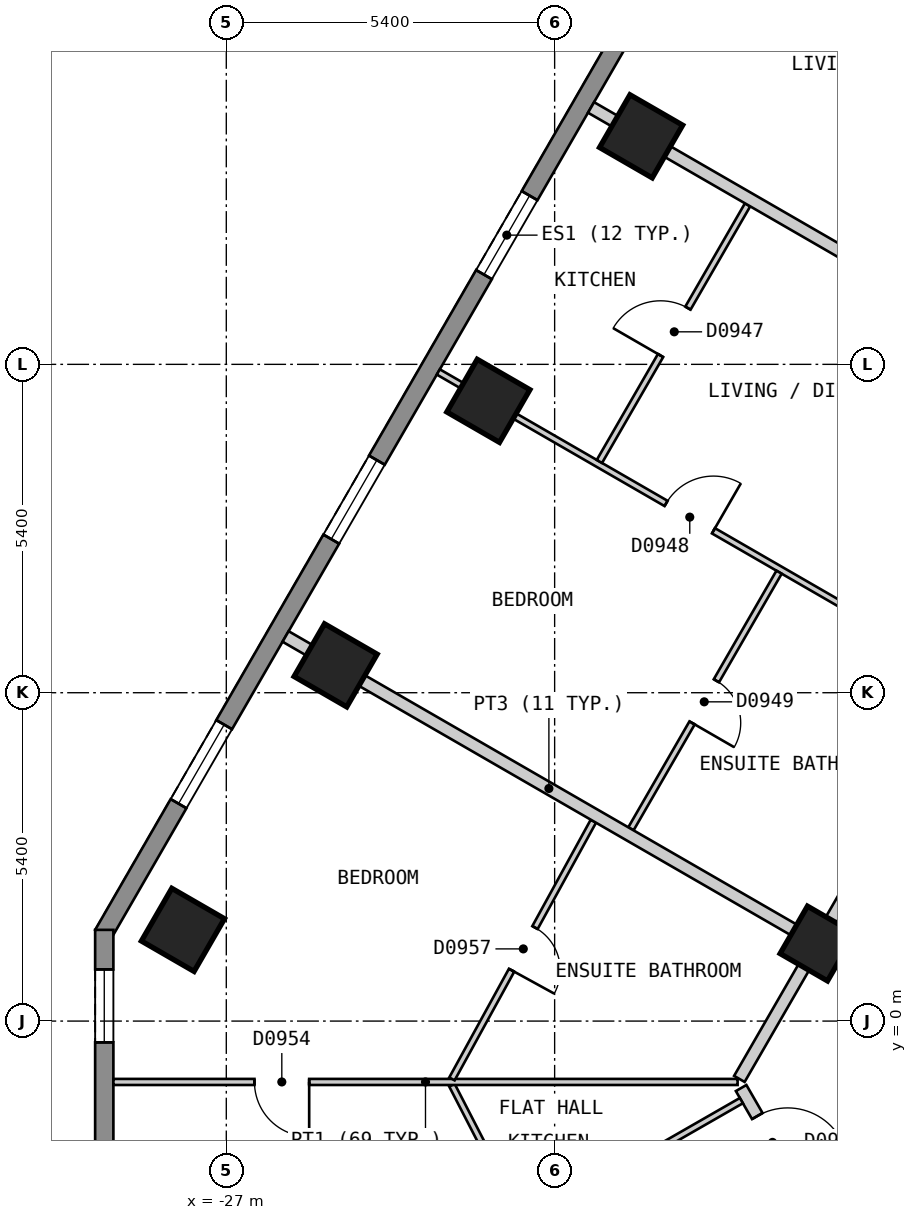
"""IFC4 building model, lengths in metres.
Left out: names, types, materials, properties, quantities, classifications, styles, units other than length and angle.
Written with IfcOpenShell. Run it as: python <this file> out.ifc"""

import sys

from ifc_helpers import new_model, si_unit, direction, frame, frame_2d, origin, origin_2d, place, context, subcontext, project, spatial, polyline, rectangle, outline, extrude, element, fill, save


model = new_model("IFC4")
c1 = context("Model", 3, precision=1e-05, world=origin(), true_north=direction((0.0, 1.0)))
c2 = subcontext(c1, "Body", "Model", "MODEL_VIEW")
j1 = project(units=[si_unit("LENGTHUNIT", "METRE"), si_unit("PLANEANGLEUNIT", "RADIAN")], contexts=[c1])
p1 = place(None, origin())
s1 = spatial("IfcSite", under=j1, at=p1, CompositionType="ELEMENT")
p2 = place(p1, origin())
s2 = spatial("IfcBuilding", under=s1, at=p2, CompositionType="ELEMENT")
p3 = place(p2, frame((0.0, 0.0, 102.0)))
s3 = spatial("IfcBuildingStorey", under=s2, at=p3, CompositionType="ELEMENT", Elevation=102.0)
for number, where, z_axis, x_axis in (
    (1, (-20.178, 14.55, 0.0), (0.0, 0.0, 1.0), (-0.5, -0.866, 0.0)),
    (2, (-22.69, 10.2, 0.0), (0.0, 0.0, 1.0), (-0.5, -0.866, 0.0)),
    (3, (-25.202, 5.85, 0.0), (0.0, 0.0, 1.0), (-0.5, -0.866, 0.0)),
    (4, (-27.713, 1.5, 0.0), (0.0, 0.0, 1.0), (-0.5, -0.866, 0.0)),
):
    element("IfcColumn", number, at=place(p3, frame(where, z_axis=z_axis, x_axis=x_axis)), inside=s3, PredefinedType="COLUMN", context=c2, shape_type="SweptSolid", body=[
        extrude(rectangle(XDim=1.0, YDim=1.0, at=origin_2d()), origin(), (0.0, 0.0, 1.0), 3.0),
    ])
p4 = place(p3, frame((-17.277, 1.275, 0.0), z_axis=(0.0, 0.0, 1.0), x_axis=(-0.5, -0.866025403784, 0.0)))
e5 = element("IfcColumn", 5, at=p4, inside=s3, PredefinedType="COLUMN", context=c2, shape_type="SweptSolid", body=[
    extrude(rectangle(XDim=0.9, YDim=0.9, at=origin_2d()), origin(), (0.0, 0.0, 1.0), 3.0),
])
p5 = place(p3, frame((-15.747, 24.425, 0.0), z_axis=(0.0, 0.0, 1.0), x_axis=(-0.500027479704, -0.866009537788, 0.0)))
e6 = element("IfcWall", 6, at=p5, inside=s3, PredefinedType="SOLIDWALL", context=c2, shape_type="SweptSolid", body=[
    extrude(outline(polyline([(0.0, -0.15), (26.559, -0.15), (26.478, 0.15), (0.08, 0.15), (0.0, -0.15)])), origin(), (0.0, 0.0, 1.0), 2.7),
])
p6 = place(p5, frame((2.483, 0.0, 0.15)))
e7 = element("IfcOpeningElement", 7, at=p6, cuts=e6, PredefinedType="OPENING", context=c2, shape_type="SweptSolid", body=[
    extrude(rectangle(XDim=1.5, YDim=2.1, at=frame_2d((0.75, 1.05))), frame((0.0, 0.16, 0.0), z_axis=(0.0, -1.0, 0.0), x_axis=(1.0, 0.0, 0.0)), (0.0, 0.0, 1.0), 0.32),
])
p7 = place(p5, frame((7.506, 0.0, 0.15)))
e8 = element("IfcOpeningElement", 8, at=p7, cuts=e6, PredefinedType="OPENING", context=c2, shape_type="SweptSolid", body=[
    extrude(rectangle(XDim=1.5, YDim=2.1, at=frame_2d((0.75, 1.05))), frame((0.0, 0.16, 0.0), z_axis=(0.0, -1.0, 0.0), x_axis=(1.0, 0.0, 0.0)), (0.0, 0.0, 1.0), 0.32),
])
p8 = place(p5, frame((12.529, 0.0, 0.15)))
e9 = element("IfcOpeningElement", 9, at=p8, cuts=e6, PredefinedType="OPENING", context=c2, shape_type="SweptSolid", body=[
    extrude(rectangle(XDim=1.5, YDim=2.1, at=frame_2d((0.75, 1.05))), frame((0.0, 0.16, 0.0), z_axis=(0.0, -1.0, 0.0), x_axis=(1.0, 0.0, 0.0)), (0.0, 0.0, 1.0), 0.32),
])
p9 = place(p5, frame((17.552, 0.0, 0.15)))
e10 = element("IfcOpeningElement", 10, at=p9, cuts=e6, PredefinedType="OPENING", context=c2, shape_type="SweptSolid", body=[
    extrude(rectangle(XDim=1.5, YDim=2.1, at=frame_2d((0.75, 1.05))), frame((0.0, 0.16, 0.0), z_axis=(0.0, -1.0, 0.0), x_axis=(1.0, 0.0, 0.0)), (0.0, 0.0, 1.0), 0.32),
])
p10 = place(p5, frame((22.575, 0.0, 0.15)))
e11 = element("IfcOpeningElement", 11, at=p10, cuts=e6, PredefinedType="OPENING", context=c2, shape_type="SweptSolid", body=[
    extrude(rectangle(XDim=1.5, YDim=2.1, at=frame_2d((0.75, 1.05))), frame((0.0, 0.16, 0.0), z_axis=(0.0, -1.0, 0.0), x_axis=(1.0, 0.0, 0.0)), (0.0, 0.0, 1.0), 0.32),
])
p11 = place(p3, frame((-29.007, 1.5, 0.0), z_axis=(0.0, 0.0, 1.0), x_axis=(0.0, -1.0, 0.0)))
e12 = element("IfcWall", 12, at=p11, inside=s3, PredefinedType="SOLIDWALL", context=c2, shape_type="SweptSolid", body=[
    extrude(outline(polyline([(0.0, -0.15), (5.0, -0.15), (4.92, 0.15), (0.08, 0.15), (0.0, -0.15)])), origin(), (0.0, 0.0, 1.0), 2.7),
])
p12 = place(p11, frame((0.65, 0.0, 0.15)))
e13 = element("IfcOpeningElement", 13, at=p12, cuts=e12, PredefinedType="OPENING", context=c2, shape_type="SweptSolid", body=[
    extrude(rectangle(XDim=1.2, YDim=2.1, at=frame_2d((0.6, 1.05))), frame((0.0, 0.16, 0.0), z_axis=(0.0, -1.0, 0.0), x_axis=(1.0, 0.0, 0.0)), (0.0, 0.0, 1.0), 0.32),
])
p13 = place(p3, frame((-18.533, -1.101, 0.0), z_axis=(0.0, 0.0, 1.0), x_axis=(0.500022085096, -0.866012652573, 0.0)))
e14 = element("IfcWall", 14, at=p13, inside=s3, PredefinedType="PARTITIONING", context=c2, shape_type="SweptSolid", body=[
    extrude(rectangle(XDim=6.066, YDim=0.2, at=frame_2d((3.033, 0.0))), origin(), (0.0, 0.0, 1.0), 2.7),
])
p14 = place(p13, frame((0.532, 0.0, 0.0)))
e15 = element("IfcOpeningElement", 15, at=p14, cuts=e14, PredefinedType="OPENING", context=c2, shape_type="SweptSolid", body=[
    extrude(rectangle(XDim=1.0, YDim=2.1, at=frame_2d((0.5, 1.05))), frame((0.0, 0.11, 0.0), z_axis=(0.0, -1.0, 0.0), x_axis=(1.0, 0.0, 0.0)), (0.0, 0.0, 1.0), 0.22),
])
p15 = place(p3, frame((-18.562, -0.951, 0.0), z_axis=(0.0, 0.0, 1.0), x_axis=(0.499987097491, 0.866032852923, 0.0)))
e16 = element("IfcWall", 16, at=p15, inside=s3, PredefinedType="PARTITIONING", context=c2, shape_type="SweptSolid", body=[
    extrude(rectangle(XDim=20.15, YDim=0.2, at=frame_2d((10.075, 0.0))), origin(), (0.0, 0.0, 1.0), 2.7),
])
p16 = place(p15, frame((14.627, 0.0, 0.0)))
e17 = element("IfcOpeningElement", 17, at=p16, cuts=e16, PredefinedType="OPENING", context=c2, shape_type="SweptSolid", body=[
    extrude(rectangle(XDim=1.0, YDim=2.1, at=frame_2d((0.5, 1.05))), frame((0.0, 0.11, 0.0), z_axis=(0.0, -1.0, 0.0), x_axis=(1.0, 0.0, 0.0)), (0.0, 0.0, 1.0), 0.22),
])
p17 = place(p15, frame((9.604, 0.0, 0.0)))
e18 = element("IfcOpeningElement", 18, at=p17, cuts=e16, PredefinedType="OPENING", context=c2, shape_type="SweptSolid", body=[
    extrude(rectangle(XDim=1.0, YDim=2.1, at=frame_2d((0.5, 1.05))), frame((0.0, 0.11, 0.0), z_axis=(0.0, -1.0, 0.0), x_axis=(1.0, 0.0, 0.0)), (0.0, 0.0, 1.0), 0.22),
])
p18 = place(p3, frame((-23.289, -1.054, 0.0), z_axis=(0.0, 0.0, 1.0), x_axis=(0.458226112305, -0.888835659726, 0.0)))
e19 = element("IfcWall", 19, at=p18, inside=s3, PredefinedType="PARTITIONING", context=c2, shape_type="SweptSolid", body=[
    extrude(rectangle(XDim=2.104, YDim=0.1, at=frame_2d((1.052, 0.0))), origin(), (0.0, 0.0, 1.0), 2.7),
])
p19 = place(p3, frame((-23.513, 10.675, 0.0), z_axis=(0.0, 0.0, 1.0), x_axis=(0.866041268327, -0.499972520799, 0.0)))
e20 = element("IfcWall", 20, at=p19, inside=s3, PredefinedType="PARTITIONING", context=c2, shape_type="SweptSolid", body=[
    extrude(rectangle(XDim=10.0, YDim=0.1, at=frame_2d((5.0, 0.0))), origin(), (0.0, 0.0, 1.0), 2.7),
])
p20 = place(p19, frame((4.325, 0.0, 0.0)))
e21 = element("IfcOpeningElement", 21, at=p20, cuts=e20, PredefinedType="OPENING", context=c2, shape_type="SweptSolid", body=[
    extrude(rectangle(XDim=0.9, YDim=2.1, at=frame_2d((0.45, 1.05))), frame((0.0, 0.06, 0.0), z_axis=(0.0, -1.0, 0.0), x_axis=(1.0, 0.0, 0.0)), (0.0, 0.0, 1.0), 0.12),
])
p21 = place(p3, frame((-18.489, 19.375, 0.0), z_axis=(0.0, 0.0, 1.0), x_axis=(0.866016855193, -0.500014806302, 0.0)))
e22 = element("IfcWall", 22, at=p21, inside=s3, PredefinedType="PARTITIONING", context=c2, shape_type="SweptSolid", body=[
    extrude(rectangle(XDim=10.0, YDim=0.1, at=frame_2d((5.0, 0.0))), origin(), (0.0, 0.0, 1.0), 2.7),
])
p22 = place(p21, frame((2.577, 0.0, 0.0)))
e23 = element("IfcOpeningElement", 23, at=p22, cuts=e22, PredefinedType="OPENING", context=c2, shape_type="SweptSolid", body=[
    extrude(rectangle(XDim=0.9, YDim=2.1, at=frame_2d((0.45, 1.05))), frame((0.0, 0.06, 0.0), z_axis=(0.0, -1.0, 0.0), x_axis=(1.0, 0.0, 0.0)), (0.0, 0.0, 1.0), 0.12),
])
p23 = place(p3, frame((-28.857, -1.001, 0.0), z_axis=(0.0, 0.0, 1.0), x_axis=(1.0, 0.0, 0.0)))
e24 = element("IfcWall", 24, at=p23, inside=s3, PredefinedType="PARTITIONING", context=c2, shape_type="SweptSolid", body=[
    extrude(rectangle(XDim=10.266, YDim=0.1, at=frame_2d((5.133, 0.0))), origin(), (0.0, 0.0, 1.0), 2.7),
])
p24 = place(p23, frame((2.32, 0.0, 0.0)))
e25 = element("IfcOpeningElement", 25, at=p24, cuts=e24, PredefinedType="OPENING", context=c2, shape_type="SweptSolid", body=[
    extrude(rectangle(XDim=0.9, YDim=2.1, at=frame_2d((0.45, 1.05))), frame((0.0, 0.06, 0.0), z_axis=(0.0, -1.0, 0.0), x_axis=(1.0, 0.0, 0.0)), (0.0, 0.0, 1.0), 0.12),
])
p25 = place(p3, frame((-20.345, 3.162, 0.0), z_axis=(0.0, 0.0, 1.0), x_axis=(0.499943653708, 0.866057932887, 0.0)))
e26 = element("IfcWall", 26, at=p25, inside=s3, PredefinedType="PARTITIONING", context=c2, shape_type="SweptSolid", body=[
    extrude(rectangle(XDim=4.873, YDim=0.1, at=frame_2d((2.436, 0.0))), origin(), (0.0, 0.0, 1.0), 2.7),
])
p26 = place(p25, frame((2.011, 0.0, 0.0)))
e27 = element("IfcOpeningElement", 27, at=p26, cuts=e26, PredefinedType="OPENING", context=c2, shape_type="SweptSolid", body=[
    extrude(rectangle(XDim=0.8, YDim=2.1, at=frame_2d((0.4, 1.05))), frame((0.0, 0.06, 0.0), z_axis=(0.0, -1.0, 0.0), x_axis=(1.0, 0.0, 0.0)), (0.0, 0.0, 1.0), 0.12),
])
p27 = place(p3, frame((-20.864, 9.203, 0.0), z_axis=(0.0, 0.0, 1.0), x_axis=(0.500072260509, 0.86598368014, 0.0)))
e28 = element("IfcWall", 28, at=p27, inside=s3, PredefinedType="PARTITIONING", context=c2, shape_type="SweptSolid", body=[
    extrude(rectangle(XDim=4.873, YDim=0.1, at=frame_2d((2.437, 0.0))), origin(), (0.0, 0.0, 1.0), 2.7),
])
p28 = place(p27, frame((2.012, 0.0, 0.0)))
e29 = element("IfcOpeningElement", 29, at=p28, cuts=e28, PredefinedType="OPENING", context=c2, shape_type="SweptSolid", body=[
    extrude(rectangle(XDim=0.9, YDim=2.1, at=frame_2d((0.45, 1.05))), frame((0.0, 0.06, 0.0), z_axis=(0.0, -1.0, 0.0), x_axis=(1.0, 0.0, 0.0)), (0.0, 0.0, 1.0), 0.12),
])
p29 = place(p3, frame((-23.289, -0.951, 0.0), z_axis=(0.0, 0.0, 1.0), x_axis=(0.481164463081, 0.876630343684, 0.0)))
e30 = element("IfcWall", 30, at=p29, inside=s3, PredefinedType="PARTITIONING", context=c2, shape_type="SweptSolid", body=[
    extrude(rectangle(XDim=4.834, YDim=0.1, at=frame_2d((2.417, 0.0))), origin(), (0.0, 0.0, 1.0), 2.7),
])
p30 = place(p29, frame((2.039, 0.0, 0.0)))
e31 = element("IfcOpeningElement", 31, at=p30, cuts=e30, PredefinedType="OPENING", context=c2, shape_type="SweptSolid", body=[
    extrude(rectangle(XDim=0.8, YDim=2.1, at=frame_2d((0.4, 1.05))), frame((0.0, 0.06, 0.0), z_axis=(0.0, -1.0, 0.0), x_axis=(1.0, 0.0, 0.0)), (0.0, 0.0, 1.0), 0.12),
])
p31 = place(p3, frame((-22.25, -3.443, 0.0), z_axis=(0.0, 0.0, 1.0), x_axis=(0.867362741349, 0.497676476156, 0.0)))
e32 = element("IfcWall", 32, at=p31, inside=s3, PredefinedType="PARTITIONING", context=c2, shape_type="SweptSolid", body=[
    extrude(rectangle(XDim=4.29, YDim=0.1, at=frame_2d((2.145, 0.0))), origin(), (0.0, 0.0, 1.0), 2.7),
])
p32 = place(p31, frame((1.715, 0.0, 0.0)))
e33 = element("IfcOpeningElement", 33, at=p32, cuts=e32, PredefinedType="OPENING", context=c2, shape_type="SweptSolid", body=[
    extrude(rectangle(XDim=0.9, YDim=2.1, at=frame_2d((0.45, 1.05))), frame((0.0, 0.06, 0.0), z_axis=(0.0, -1.0, 0.0), x_axis=(1.0, 0.0, 0.0)), (0.0, 0.0, 1.0), 0.12),
])
p33 = place(p3, frame((-26.025, 6.325, 0.0), z_axis=(0.0, 0.0, 1.0), x_axis=(0.866041268327, -0.499972520799, 0.0)))
e34 = element("IfcWall", 34, at=p33, inside=s3, PredefinedType="PARTITIONING", context=c2, shape_type="SweptSolid", body=[
    extrude(rectangle(XDim=10.0, YDim=0.2, at=frame_2d((5.0, 0.0))), origin(), (0.0, 0.0, 1.0), 2.7),
])
p34 = place(p3, frame((-21.001, 15.025, 0.0), z_axis=(0.0, 0.0, 1.0), x_axis=(0.866016855193, -0.500014806302, 0.0)))
e35 = element("IfcWall", 35, at=p34, inside=s3, PredefinedType="PARTITIONING", context=c2, shape_type="SweptSolid", body=[
    extrude(rectangle(XDim=10.0, YDim=0.2, at=frame_2d((5.0, 0.0))), origin(), (0.0, 0.0, 1.0), 2.7),
])
p35 = place(p8, origin())
e36 = element("IfcWindow", 36, at=p35, inside=s3, PartitioningType="SINGLE_PANEL", PredefinedType="WINDOW", context=c2, shape_type="SweptSolid", body=[
    extrude(rectangle(XDim=1.5, YDim=2.1, at=frame_2d((0.75, 1.05))), frame((0.0, 0.03, 0.0), z_axis=(0.0, -1.0, 0.0), x_axis=(1.0, 0.0, 0.0)), (0.0, 0.0, 1.0), 0.06),
])
fill(e9, e36)
p36 = place(p9, origin())
e37 = element("IfcWindow", 37, at=p36, inside=s3, PartitioningType="SINGLE_PANEL", PredefinedType="WINDOW", context=c2, shape_type="SweptSolid", body=[
    extrude(rectangle(XDim=1.5, YDim=2.1, at=frame_2d((0.75, 1.05))), frame((0.0, 0.03, 0.0), z_axis=(0.0, -1.0, 0.0), x_axis=(1.0, 0.0, 0.0)), (0.0, 0.0, 1.0), 0.06),
])
fill(e10, e37)
p37 = place(p10, origin())
e38 = element("IfcWindow", 38, at=p37, inside=s3, PartitioningType="SINGLE_PANEL", PredefinedType="WINDOW", context=c2, shape_type="SweptSolid", body=[
    extrude(rectangle(XDim=1.5, YDim=2.1, at=frame_2d((0.75, 1.05))), frame((0.0, 0.03, 0.0), z_axis=(0.0, -1.0, 0.0), x_axis=(1.0, 0.0, 0.0)), (0.0, 0.0, 1.0), 0.06),
])
fill(e11, e38)
p38 = place(p12, origin())
e39 = element("IfcWindow", 39, at=p38, inside=s3, PartitioningType="SINGLE_PANEL", PredefinedType="WINDOW", context=c2, shape_type="SweptSolid", body=[
    extrude(rectangle(XDim=1.2, YDim=2.1, at=frame_2d((0.6, 1.05))), frame((0.0, 0.03, 0.0), z_axis=(0.0, -1.0, 0.0), x_axis=(1.0, 0.0, 0.0)), (0.0, 0.0, 1.0), 0.06),
])
fill(e13, e39)
p39 = place(p28, origin())
e40 = element("IfcDoor", 40, at=p39, inside=s3, OperationType="SINGLE_SWING_LEFT", PredefinedType="DOOR", context=c2, shape_type="SweptSolid", body=[
    extrude(rectangle(XDim=0.9, YDim=2.1, at=frame_2d((0.45, 1.05))), frame((0.0, 0.025, 0.0), z_axis=(0.0, -1.0, 0.0), x_axis=(1.0, 0.0, 0.0)), (0.0, 0.0, 1.0), 0.05),
])
fill(e29, e40)
p40 = place(p20, origin())
e41 = element("IfcDoor", 41, at=p40, inside=s3, OperationType="SINGLE_SWING_RIGHT", PredefinedType="DOOR", context=c2, shape_type="SweptSolid", body=[
    extrude(rectangle(XDim=0.9, YDim=2.1, at=frame_2d((0.45, 1.05))), frame((0.0, 0.025, 0.0), z_axis=(0.0, -1.0, 0.0), x_axis=(1.0, 0.0, 0.0)), (0.0, 0.0, 1.0), 0.05),
])
fill(e21, e41)
p41 = place(p26, origin())
e42 = element("IfcDoor", 42, at=p41, inside=s3, OperationType="SINGLE_SWING_LEFT", PredefinedType="DOOR", context=c2, shape_type="SweptSolid", body=[
    extrude(rectangle(XDim=0.8, YDim=2.1, at=frame_2d((0.4, 1.05))), frame((0.0, 0.025, 0.0), z_axis=(0.0, -1.0, 0.0), x_axis=(1.0, 0.0, 0.0)), (0.0, 0.0, 1.0), 0.05),
])
fill(e27, e42)
p42 = place(p14, origin())
e43 = element("IfcDoor", 43, at=p42, inside=s3, OperationType="SINGLE_SWING_RIGHT", PredefinedType="DOOR", context=c2, shape_type="SweptSolid", body=[
    extrude(rectangle(XDim=1.0, YDim=2.1, at=frame_2d((0.5, 1.05))), frame((0.0, 0.025, 0.0), z_axis=(0.0, -1.0, 0.0), x_axis=(1.0, 0.0, 0.0)), (0.0, 0.0, 1.0), 0.05),
])
fill(e15, e43)
p43 = place(p24, origin())
e44 = element("IfcDoor", 44, at=p43, inside=s3, OperationType="SINGLE_SWING_RIGHT", PredefinedType="DOOR", context=c2, shape_type="SweptSolid", body=[
    extrude(rectangle(XDim=0.9, YDim=2.1, at=frame_2d((0.45, 1.05))), frame((0.0, 0.025, 0.0), z_axis=(0.0, -1.0, 0.0), x_axis=(1.0, 0.0, 0.0)), (0.0, 0.0, 1.0), 0.05),
])
fill(e25, e44)
p44 = place(p30, origin())
e45 = element("IfcDoor", 45, at=p44, inside=s3, OperationType="SINGLE_SWING_LEFT", PredefinedType="DOOR", context=c2, shape_type="SweptSolid", body=[
    extrude(rectangle(XDim=0.8, YDim=2.1, at=frame_2d((0.4, 1.05))), frame((0.0, 0.025, 0.0), z_axis=(0.0, -1.0, 0.0), x_axis=(1.0, 0.0, 0.0)), (0.0, 0.0, 1.0), 0.05),
])
fill(e31, e45)
save(model, sys.argv[1])
